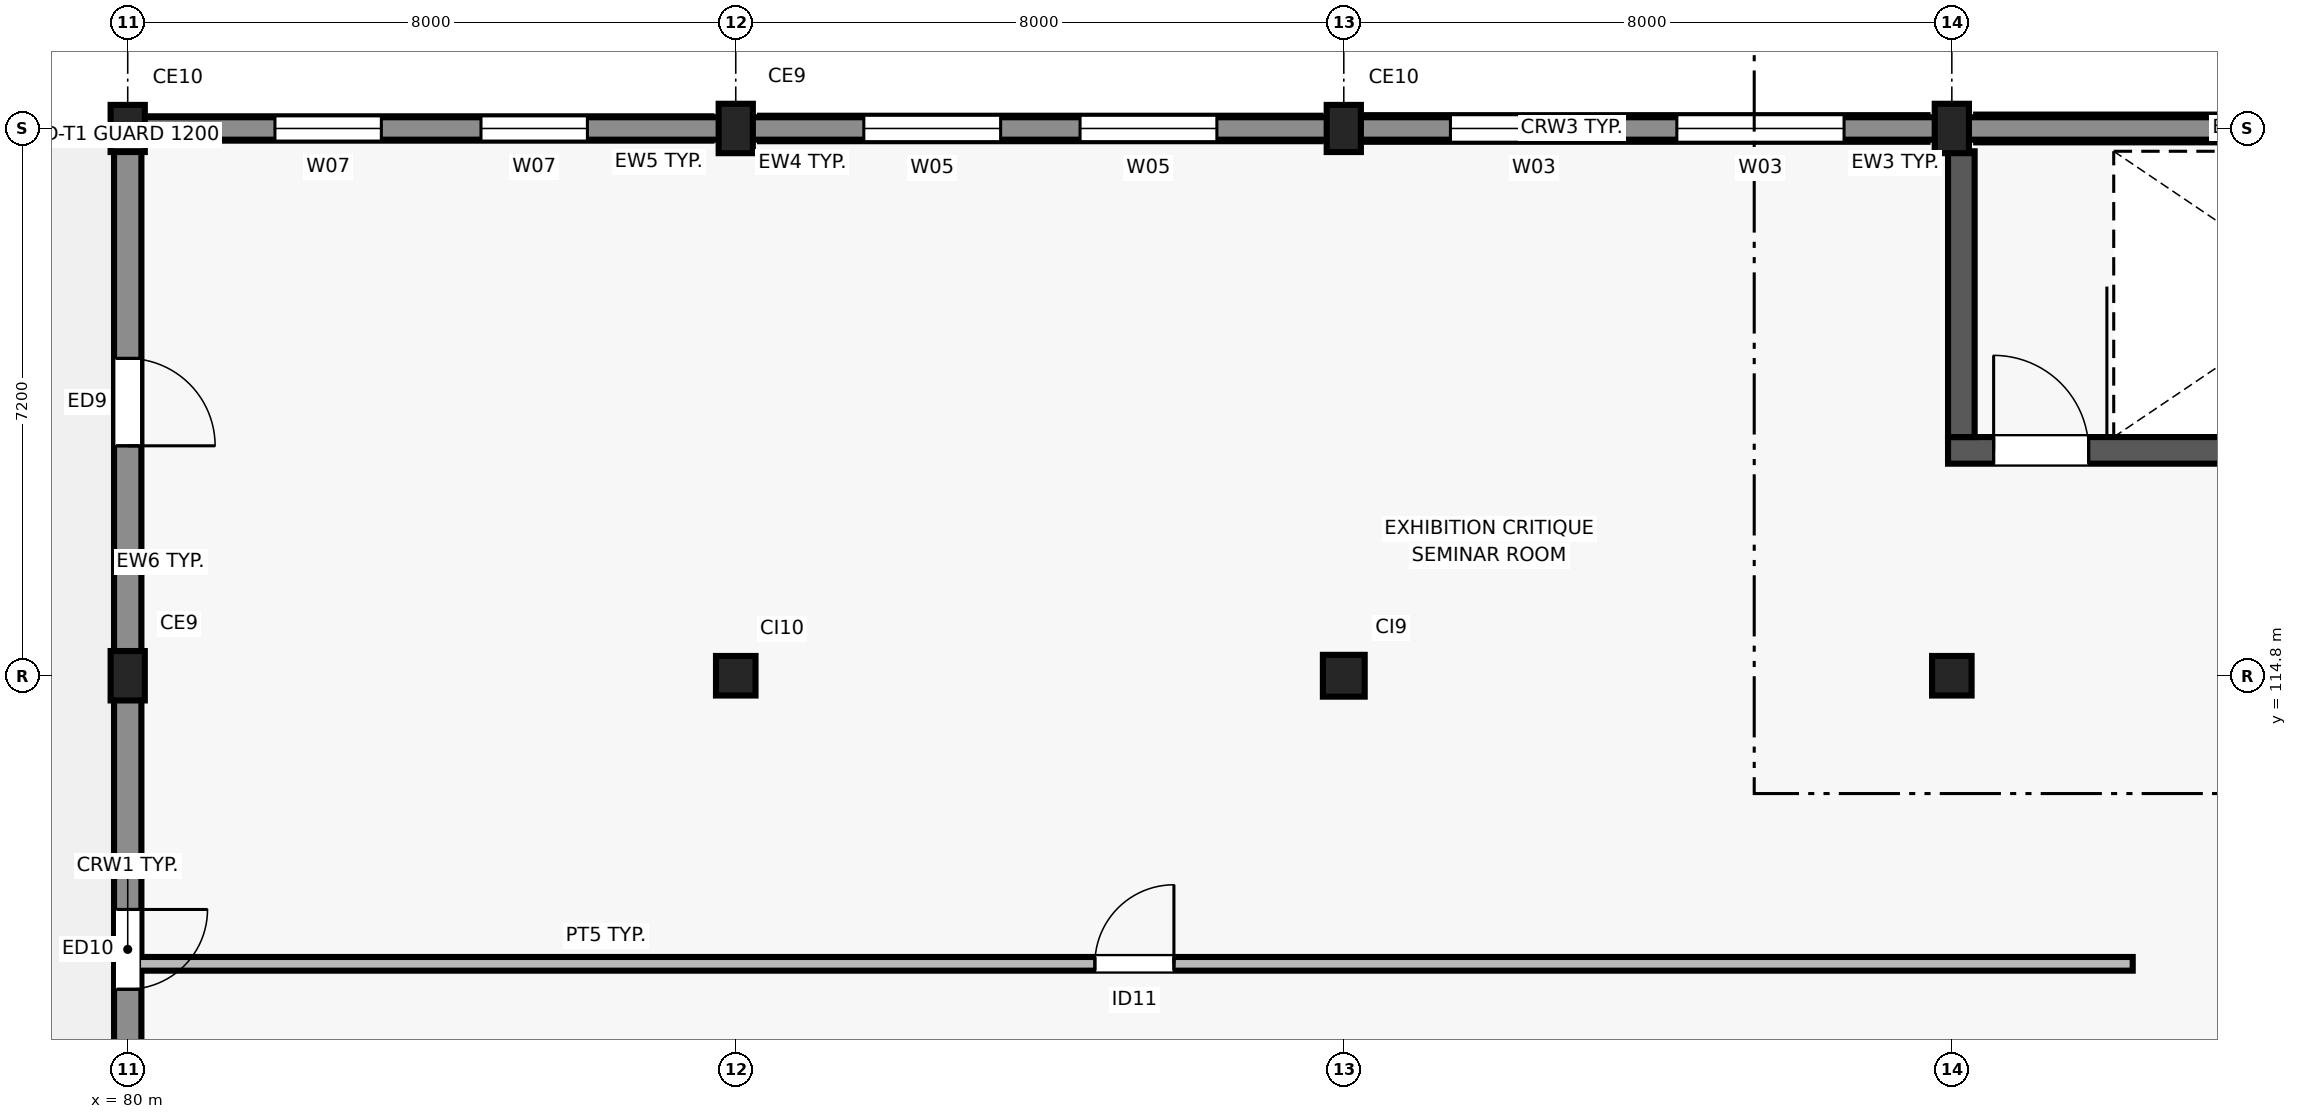
"""IFC4 building model, lengths in metres.
Left out: names, types, materials, properties, quantities, classifications, styles, units other than length and angle.
Written with IfcOpenShell. Run it as: python <this file> out.ifc"""

import sys

from ifc_helpers import new_model, si_unit, direction, frame, frame_2d, origin, origin_2d, place, context, subcontext, project, spatial, polyline, rectangle, outline, extrude, element, fill, save


model = new_model("IFC4")
c1 = context("Model", 3, precision=1e-05, world=origin(), true_north=direction((0.0, 1.0)))
c2 = subcontext(c1, "Body", "Model", "MODEL_VIEW")
j1 = project(units=[si_unit("LENGTHUNIT", "METRE"), si_unit("PLANEANGLEUNIT", "RADIAN")], contexts=[c1])
p1 = place(None, origin())
s1 = spatial("IfcSite", under=j1, at=p1, CompositionType="ELEMENT")
p2 = place(p1, origin())
s2 = spatial("IfcBuilding", under=s1, at=p2, CompositionType="ELEMENT")
p3 = place(p2, frame((0.0, 0.0, 25.8)))
s3 = spatial("IfcBuildingStorey", under=s2, at=p3, CompositionType="ELEMENT", Elevation=25.8)
p4 = place(p3, frame((80.0, 114.8, 0.0), z_axis=(0.0, 0.0, 1.0), x_axis=(1.0, 0.0, 0.0)))
e1 = element("IfcColumn", 1, at=p4, inside=s3, PredefinedType="COLUMN", context=c2, shape_type="SweptSolid", body=[
    extrude(rectangle(XDim=0.65, YDim=0.45, at=origin_2d()), origin(), (0.0, 0.0, 1.0), 4.2),
])
p5 = place(p3, frame((80.0, 122.0, 0.0), z_axis=(0.0, 0.0, 1.0), x_axis=(1.0, 0.0, 0.0)))
e2 = element("IfcColumn", 2, at=p5, inside=s3, PredefinedType="COLUMN", context=c2, shape_type="SweptSolid", body=[
    extrude(rectangle(XDim=0.62, YDim=0.45, at=origin_2d()), origin(), (0.0, 0.0, 1.0), 4.2),
])
p6 = place(p3, frame((88.0, 114.8, 0.0), z_axis=(0.0, 0.0, 1.0), x_axis=(1.0, 0.0, 0.0)))
e3 = element("IfcColumn", 3, at=p6, inside=s3, PredefinedType="COLUMN", context=c2, shape_type="SweptSolid", body=[
    extrude(rectangle(XDim=0.52, YDim=0.52, at=origin_2d()), origin(), (0.0, 0.0, 1.0), 4.2),
])
p7 = place(p3, frame((88.0, 122.0, 0.0), z_axis=(0.0, 0.0, 1.0), x_axis=(1.0, 0.0, 0.0)))
e4 = element("IfcColumn", 4, at=p7, inside=s3, PredefinedType="COLUMN", context=c2, shape_type="SweptSolid", body=[
    extrude(rectangle(XDim=0.65, YDim=0.45, at=origin_2d()), origin(), (0.0, 0.0, 1.0), 4.2),
])
p8 = place(p3, frame((96.0, 114.8, 0.0), z_axis=(0.0, 0.0, 1.0), x_axis=(1.0, 0.0, 0.0)))
e5 = element("IfcColumn", 5, at=p8, inside=s3, PredefinedType="COLUMN", context=c2, shape_type="SweptSolid", body=[
    extrude(rectangle(XDim=0.55, YDim=0.55, at=origin_2d()), origin(), (0.0, 0.0, 1.0), 4.2),
])
p9 = place(p3, frame((96.0, 122.0, 0.0), z_axis=(0.0, 0.0, 1.0), x_axis=(1.0, 0.0, 0.0)))
e6 = element("IfcColumn", 6, at=p9, inside=s3, PredefinedType="COLUMN", context=c2, shape_type="SweptSolid", body=[
    extrude(rectangle(XDim=0.62, YDim=0.45, at=origin_2d()), origin(), (0.0, 0.0, 1.0), 4.2),
])
p10 = place(p3, frame((104.0, 114.8, 0.0), z_axis=(0.0, 0.0, 1.0), x_axis=(1.0, 0.0, 0.0)))
e7 = element("IfcColumn", 7, at=p10, inside=s3, PredefinedType="COLUMN", context=c2, shape_type="SweptSolid", body=[
    extrude(rectangle(XDim=0.52, YDim=0.52, at=origin_2d()), origin(), (0.0, 0.0, 1.0), 4.2),
])
p11 = place(p3, frame((104.0, 122.0, 0.0), z_axis=(0.0, 0.0, 1.0), x_axis=(1.0, 0.0, 0.0)))
e8 = element("IfcColumn", 8, at=p11, inside=s3, PredefinedType="COLUMN", context=c2, shape_type="SweptSolid", body=[
    extrude(rectangle(XDim=0.65, YDim=0.45, at=origin_2d()), origin(), (0.0, 0.0, 1.0), 4.2),
])
p12 = place(p3, frame((111.695, 122.0, 0.0), z_axis=(0.0, 0.0, 1.0), x_axis=(-1.0, 0.0, 0.0)))
e9 = element("IfcWall", 9, at=p12, inside=s3, PredefinedType="SOLIDWALL", context=c2, shape_type="SweptSolid", body=[
    extrude(rectangle(XDim=7.375, YDim=0.365, at=frame_2d((3.688, 0.0))), origin(), (0.0, 0.0, 1.0), 3.92),
])
p13 = place(p3, frame((103.68, 122.0, 0.0), z_axis=(0.0, 0.0, 1.0), x_axis=(-1.0, 0.0, 0.0)))
e10 = element("IfcWall", 10, at=p13, inside=s3, PredefinedType="SOLIDWALL", context=c2, shape_type="SweptSolid", body=[
    extrude(rectangle(XDim=7.375, YDim=0.35, at=frame_2d((3.688, 0.0))), origin(), (0.0, 0.0, 1.0), 3.425),
])
p14 = place(p13, frame((1.098, 0.0, 0.9)))
e11 = element("IfcOpeningElement", 11, at=p14, cuts=e10, PredefinedType="OPENING", context=c2, shape_type="SweptSolid", body=[
    extrude(rectangle(XDim=2.2, YDim=1.8, at=frame_2d((1.1, 0.9))), frame((0.0, 0.185, 0.0), z_axis=(0.0, -1.0, 0.0), x_axis=(1.0, 0.0, 0.0)), (0.0, 0.0, 1.0), 0.37),
])
p15 = place(p13, frame((4.077, 0.0, 0.9)))
e12 = element("IfcOpeningElement", 12, at=p15, cuts=e10, PredefinedType="OPENING", context=c2, shape_type="SweptSolid", body=[
    extrude(rectangle(XDim=2.2, YDim=1.8, at=frame_2d((1.1, 0.9))), frame((0.0, 0.185, 0.0), z_axis=(0.0, -1.0, 0.0), x_axis=(1.0, 0.0, 0.0)), (0.0, 0.0, 1.0), 0.37),
])
p16 = place(p3, frame((95.695, 122.0, 0.0), z_axis=(0.0, 0.0, 1.0), x_axis=(-1.0, 0.0, 0.0)))
e13 = element("IfcWall", 13, at=p16, inside=s3, PredefinedType="SOLIDWALL", context=c2, shape_type="SweptSolid", body=[
    extrude(rectangle(XDim=7.375, YDim=0.335, at=frame_2d((3.688, 0.0))), origin(), (0.0, 0.0, 1.0), 3.375),
])
p17 = place(p16, frame((1.365, 0.0, 0.9)))
e14 = element("IfcOpeningElement", 14, at=p17, cuts=e13, PredefinedType="OPENING", context=c2, shape_type="SweptSolid", body=[
    extrude(rectangle(XDim=1.8, YDim=1.8, at=frame_2d((0.9, 0.9))), frame((0.0, 0.177, 0.0), z_axis=(0.0, -1.0, 0.0), x_axis=(1.0, 0.0, 0.0)), (0.0, 0.0, 1.0), 0.355),
])
p18 = place(p16, frame((4.21, 0.0, 0.9)))
e15 = element("IfcOpeningElement", 15, at=p18, cuts=e13, PredefinedType="OPENING", context=c2, shape_type="SweptSolid", body=[
    extrude(rectangle(XDim=1.8, YDim=1.8, at=frame_2d((0.9, 0.9))), frame((0.0, 0.177, 0.0), z_axis=(0.0, -1.0, 0.0), x_axis=(1.0, 0.0, 0.0)), (0.0, 0.0, 1.0), 0.355),
])
p19 = place(p3, frame((87.68, 122.0, 0.0), z_axis=(0.0, 0.0, 1.0), x_axis=(-1.0, 0.0, 0.0)))
e16 = element("IfcWall", 16, at=p19, inside=s3, PredefinedType="SOLIDWALL", context=c2, shape_type="SweptSolid", body=[
    extrude(rectangle(XDim=7.375, YDim=0.32, at=frame_2d((3.688, 0.0))), origin(), (0.0, 0.0, 1.0), 3.425),
])
p20 = place(p19, frame((1.632, 0.0, 0.9)))
e17 = element("IfcOpeningElement", 17, at=p20, cuts=e16, PredefinedType="OPENING", context=c2, shape_type="SweptSolid", body=[
    extrude(rectangle(XDim=1.4, YDim=1.8, at=frame_2d((0.7, 0.9))), frame((0.0, 0.17, 0.0), z_axis=(0.0, -1.0, 0.0), x_axis=(1.0, 0.0, 0.0)), (0.0, 0.0, 1.0), 0.34),
])
p21 = place(p19, frame((4.343, 0.0, 0.9)))
e18 = element("IfcOpeningElement", 18, at=p21, cuts=e16, PredefinedType="OPENING", context=c2, shape_type="SweptSolid", body=[
    extrude(rectangle(XDim=1.4, YDim=1.8, at=frame_2d((0.7, 0.9))), frame((0.0, 0.17, 0.0), z_axis=(0.0, -1.0, 0.0), x_axis=(1.0, 0.0, 0.0)), (0.0, 0.0, 1.0), 0.34),
])
p22 = place(p3, frame((80.0, 121.78, 0.0), z_axis=(0.0, 0.0, 1.0), x_axis=(0.0, -1.0, 0.0)))
e19 = element("IfcWall", 19, at=p22, inside=s3, PredefinedType="SOLIDWALL", context=c2, shape_type="SweptSolid", body=[
    extrude(rectangle(XDim=6.76, YDim=0.305, at=frame_2d((3.38, 0.0))), origin(), (0.0, 0.0, 1.0), 3.355),
])
p23 = place(p22, frame((2.805, 0.0, 0.0)))
e20 = element("IfcOpeningElement", 20, at=p23, cuts=e19, PredefinedType="OPENING", context=c2, shape_type="SweptSolid", body=[
    extrude(rectangle(XDim=1.15, YDim=2.2, at=frame_2d((0.575, 1.1))), frame((0.0, 0.162, 0.0), z_axis=(0.0, -1.0, 0.0), x_axis=(1.0, 0.0, 0.0)), (0.0, 0.0, 1.0), 0.325),
])
p24 = place(p3, frame((80.0, 114.58, 0.0), z_axis=(0.0, 0.0, 1.0), x_axis=(0.0, -1.0, 0.0)))
e21 = element("IfcWall", 21, at=p24, inside=s3, PredefinedType="SOLIDWALL", context=c2, shape_type="SweptSolid", body=[
    extrude(rectangle(XDim=6.76, YDim=0.29, at=frame_2d((3.38, 0.0))), origin(), (0.0, 0.0, 1.0), 3.535),
])
p25 = place(p24, frame((2.855, 0.0, 0.0)))
e22 = element("IfcOpeningElement", 22, at=p25, cuts=e21, PredefinedType="OPENING", context=c2, shape_type="SweptSolid", body=[
    extrude(rectangle(XDim=1.05, YDim=2.15, at=frame_2d((0.525, 1.075))), frame((0.0, 0.155, 0.0), z_axis=(0.0, -1.0, 0.0), x_axis=(1.0, 0.0, 0.0)), (0.0, 0.0, 1.0), 0.31),
])
p26 = place(p3, frame((80.0, 100.4, 4.2), z_axis=(0.0, 0.0, 1.0), x_axis=(0.0, 1.0, 0.0)))
e23 = element("IfcWall", 23, at=p26, inside=s3, PredefinedType="PARAPET", context=c2, shape_type="SweptSolid", body=[
    extrude(outline(polyline([(0.0, 0.0), (21.6, 0.0), (21.6, 4.4), (20.25, 4.08), (18.9, 3.797), (17.55, 3.551), (16.2, 3.342), (14.85, 3.169), (13.5, 3.032), (12.15, 2.93), (10.8, 2.864), (9.45, 2.833), (8.1, 2.836), (6.75, 2.875), (5.4, 2.949), (4.05, 3.058), (2.7, 3.203), (1.35, 3.383), (0.0, 3.6), (0.0, 0.0)])), frame((0.0, 0.18, 0.0), z_axis=(0.0, -1.0, 0.0), x_axis=(1.0, 0.0, 0.0)), (0.0, 0.0, 1.0), 0.36),
])
p27 = place(p3, frame((80.0, 122.0, 4.2), z_axis=(0.0, 0.0, 1.0), x_axis=(1.0, 0.0, 0.0)))
e24 = element("IfcWall", 24, at=p27, inside=s3, PredefinedType="PARAPET", context=c2, shape_type="SweptSolid", body=[
    extrude(outline(polyline([(0.0, 0.0), (38.0, 0.0), (38.0, 4.1), (35.625, 3.255), (33.25, 2.536), (30.875, 1.939), (28.5, 1.458), (26.125, 1.092), (23.75, 0.837), (21.375, 0.691), (19.0, 0.654), (16.625, 0.726), (14.25, 0.907), (11.875, 1.198), (9.5, 1.6), (7.125, 2.118), (4.75, 2.754), (2.375, 3.513), (0.0, 4.4), (0.0, 0.0)])), frame((0.0, 0.147, 0.0), z_axis=(0.0, -1.0, 0.0), x_axis=(1.0, 0.0, 0.0)), (0.0, 0.0, 1.0), 0.295),
])
p28 = place(p3, frame((103.95, 117.765, 0.0), z_axis=(0.0, 0.0, 1.0), x_axis=(1.0, 0.0, 0.0)))
e25 = element("IfcWall", 25, at=p28, inside=s3, PredefinedType="SHEAR", context=c2, shape_type="SweptSolid", body=[
    extrude(rectangle(XDim=8.1, YDim=0.35, at=frame_2d((4.05, 0.0))), origin(), (0.0, 0.0, 1.0), 3.92),
])
p29 = place(p28, frame((0.6, 0.0, 0.0)))
e26 = element("IfcOpeningElement", 26, at=p29, cuts=e25, PredefinedType="OPENING", context=c2, shape_type="SweptSolid", body=[
    extrude(rectangle(XDim=1.25, YDim=2.2, at=frame_2d((0.625, 1.1))), frame((0.0, 0.185, 0.0), z_axis=(0.0, -1.0, 0.0), x_axis=(1.0, 0.0, 0.0)), (0.0, 0.0, 1.0), 0.37),
])
p30 = place(p3, frame((104.125, 117.94, 0.0), z_axis=(0.0, 0.0, 1.0), x_axis=(0.0, 1.0, 0.0)))
e27 = element("IfcWall", 27, at=p30, inside=s3, PredefinedType="SHEAR", context=c2, shape_type="SweptSolid", body=[
    extrude(rectangle(XDim=3.76, YDim=0.35, at=frame_2d((1.88, 0.0))), origin(), (0.0, 0.0, 1.0), 3.92),
])
p31 = place(p3, frame((80.11, 111.01, 0.0), z_axis=(0.0, 0.0, 1.0), x_axis=(1.0, 0.0, 0.0)))
e28 = element("IfcWall", 28, at=p31, inside=s3, PredefinedType="PARTITIONING", context=c2, shape_type="SweptSolid", body=[
    extrude(rectangle(XDim=26.27, YDim=0.18, at=frame_2d((13.135, 0.0))), origin(), (0.0, 0.0, 1.0), 3.9),
])
p32 = place(p31, frame((12.615, 0.0, 0.0)))
e29 = element("IfcOpeningElement", 29, at=p32, cuts=e28, PredefinedType="OPENING", context=c2, shape_type="SweptSolid", body=[
    extrude(rectangle(XDim=1.04, YDim=2.15, at=frame_2d((0.52, 1.075))), frame((0.0, 0.1, 0.0), z_axis=(0.0, -1.0, 0.0), x_axis=(1.0, 0.0, 0.0)), (0.0, 0.0, 1.0), 0.2),
])
p33 = place(p14, origin())
e30 = element("IfcWindow", 30, at=p33, inside=s3, PartitioningType="SINGLE_PANEL", PredefinedType="WINDOW", context=c2, shape_type="SweptSolid", body=[
    extrude(rectangle(XDim=2.2, YDim=1.8, at=frame_2d((1.1, 0.9))), frame((0.0, 0.03, 0.0), z_axis=(0.0, -1.0, 0.0), x_axis=(1.0, 0.0, 0.0)), (0.0, 0.0, 1.0), 0.06),
])
fill(e11, e30)
p34 = place(p15, origin())
e31 = element("IfcWindow", 31, at=p34, inside=s3, PartitioningType="SINGLE_PANEL", PredefinedType="WINDOW", context=c2, shape_type="SweptSolid", body=[
    extrude(rectangle(XDim=2.2, YDim=1.8, at=frame_2d((1.1, 0.9))), frame((0.0, 0.03, 0.0), z_axis=(0.0, -1.0, 0.0), x_axis=(1.0, 0.0, 0.0)), (0.0, 0.0, 1.0), 0.06),
])
fill(e12, e31)
p35 = place(p17, origin())
e32 = element("IfcWindow", 32, at=p35, inside=s3, PartitioningType="SINGLE_PANEL", PredefinedType="WINDOW", context=c2, shape_type="SweptSolid", body=[
    extrude(rectangle(XDim=1.8, YDim=1.8, at=frame_2d((0.9, 0.9))), frame((0.0, 0.03, 0.0), z_axis=(0.0, -1.0, 0.0), x_axis=(1.0, 0.0, 0.0)), (0.0, 0.0, 1.0), 0.06),
])
fill(e14, e32)
p36 = place(p18, origin())
e33 = element("IfcWindow", 33, at=p36, inside=s3, PartitioningType="SINGLE_PANEL", PredefinedType="WINDOW", context=c2, shape_type="SweptSolid", body=[
    extrude(rectangle(XDim=1.8, YDim=1.8, at=frame_2d((0.9, 0.9))), frame((0.0, 0.03, 0.0), z_axis=(0.0, -1.0, 0.0), x_axis=(1.0, 0.0, 0.0)), (0.0, 0.0, 1.0), 0.06),
])
fill(e15, e33)
p37 = place(p20, origin())
e34 = element("IfcWindow", 34, at=p37, inside=s3, PartitioningType="SINGLE_PANEL", PredefinedType="WINDOW", context=c2, shape_type="SweptSolid", body=[
    extrude(rectangle(XDim=1.4, YDim=1.8, at=frame_2d((0.7, 0.9))), frame((0.0, 0.03, 0.0), z_axis=(0.0, -1.0, 0.0), x_axis=(1.0, 0.0, 0.0)), (0.0, 0.0, 1.0), 0.06),
])
fill(e17, e34)
p38 = place(p21, origin())
e35 = element("IfcWindow", 35, at=p38, inside=s3, PartitioningType="SINGLE_PANEL", PredefinedType="WINDOW", context=c2, shape_type="SweptSolid", body=[
    extrude(rectangle(XDim=1.4, YDim=1.8, at=frame_2d((0.7, 0.9))), frame((0.0, 0.03, 0.0), z_axis=(0.0, -1.0, 0.0), x_axis=(1.0, 0.0, 0.0)), (0.0, 0.0, 1.0), 0.06),
])
fill(e18, e35)
p39 = place(p23, frame((1.15, 0.0, 0.0), z_axis=(0.0, 0.0, 1.0), x_axis=(-1.0, 0.0, 0.0)))
e36 = element("IfcDoor", 36, at=p39, inside=s3, OperationType="SINGLE_SWING_RIGHT", PredefinedType="DOOR", context=c2, shape_type="SweptSolid", body=[
    extrude(rectangle(XDim=1.15, YDim=2.2, at=frame_2d((0.575, 1.1))), frame((0.0, 0.025, 0.0), z_axis=(0.0, -1.0, 0.0), x_axis=(1.0, 0.0, 0.0)), (0.0, 0.0, 1.0), 0.05),
])
fill(e20, e36)
p40 = place(p25, frame((1.05, 0.0, 0.0), z_axis=(0.0, 0.0, 1.0), x_axis=(-1.0, 0.0, 0.0)))
e37 = element("IfcDoor", 37, at=p40, inside=s3, OperationType="SINGLE_SWING_LEFT", PredefinedType="DOOR", context=c2, shape_type="SweptSolid", body=[
    extrude(rectangle(XDim=1.05, YDim=2.15, at=frame_2d((0.525, 1.075))), frame((0.0, 0.025, 0.0), z_axis=(0.0, -1.0, 0.0), x_axis=(1.0, 0.0, 0.0)), (0.0, 0.0, 1.0), 0.05),
])
fill(e22, e37)
p41 = place(p29, origin())
e38 = element("IfcDoor", 38, at=p41, inside=s3, OperationType="SINGLE_SWING_LEFT", PredefinedType="DOOR", context=c2, shape_type="SweptSolid", body=[
    extrude(rectangle(XDim=1.25, YDim=2.2, at=frame_2d((0.625, 1.1))), frame((0.0, 0.025, 0.0), z_axis=(0.0, -1.0, 0.0), x_axis=(1.0, 0.0, 0.0)), (0.0, 0.0, 1.0), 0.05),
])
fill(e26, e38)
p42 = place(p32, origin())
e39 = element("IfcDoor", 39, at=p42, inside=s3, OperationType="SINGLE_SWING_RIGHT", PredefinedType="DOOR", context=c2, shape_type="SweptSolid", body=[
    extrude(rectangle(XDim=1.04, YDim=2.15, at=frame_2d((0.52, 1.075))), frame((0.0, 0.025, 0.0), z_axis=(0.0, -1.0, 0.0), x_axis=(1.0, 0.0, 0.0)), (0.0, 0.0, 1.0), 0.05),
])
fill(e29, e39)
save(model, sys.argv[1])
